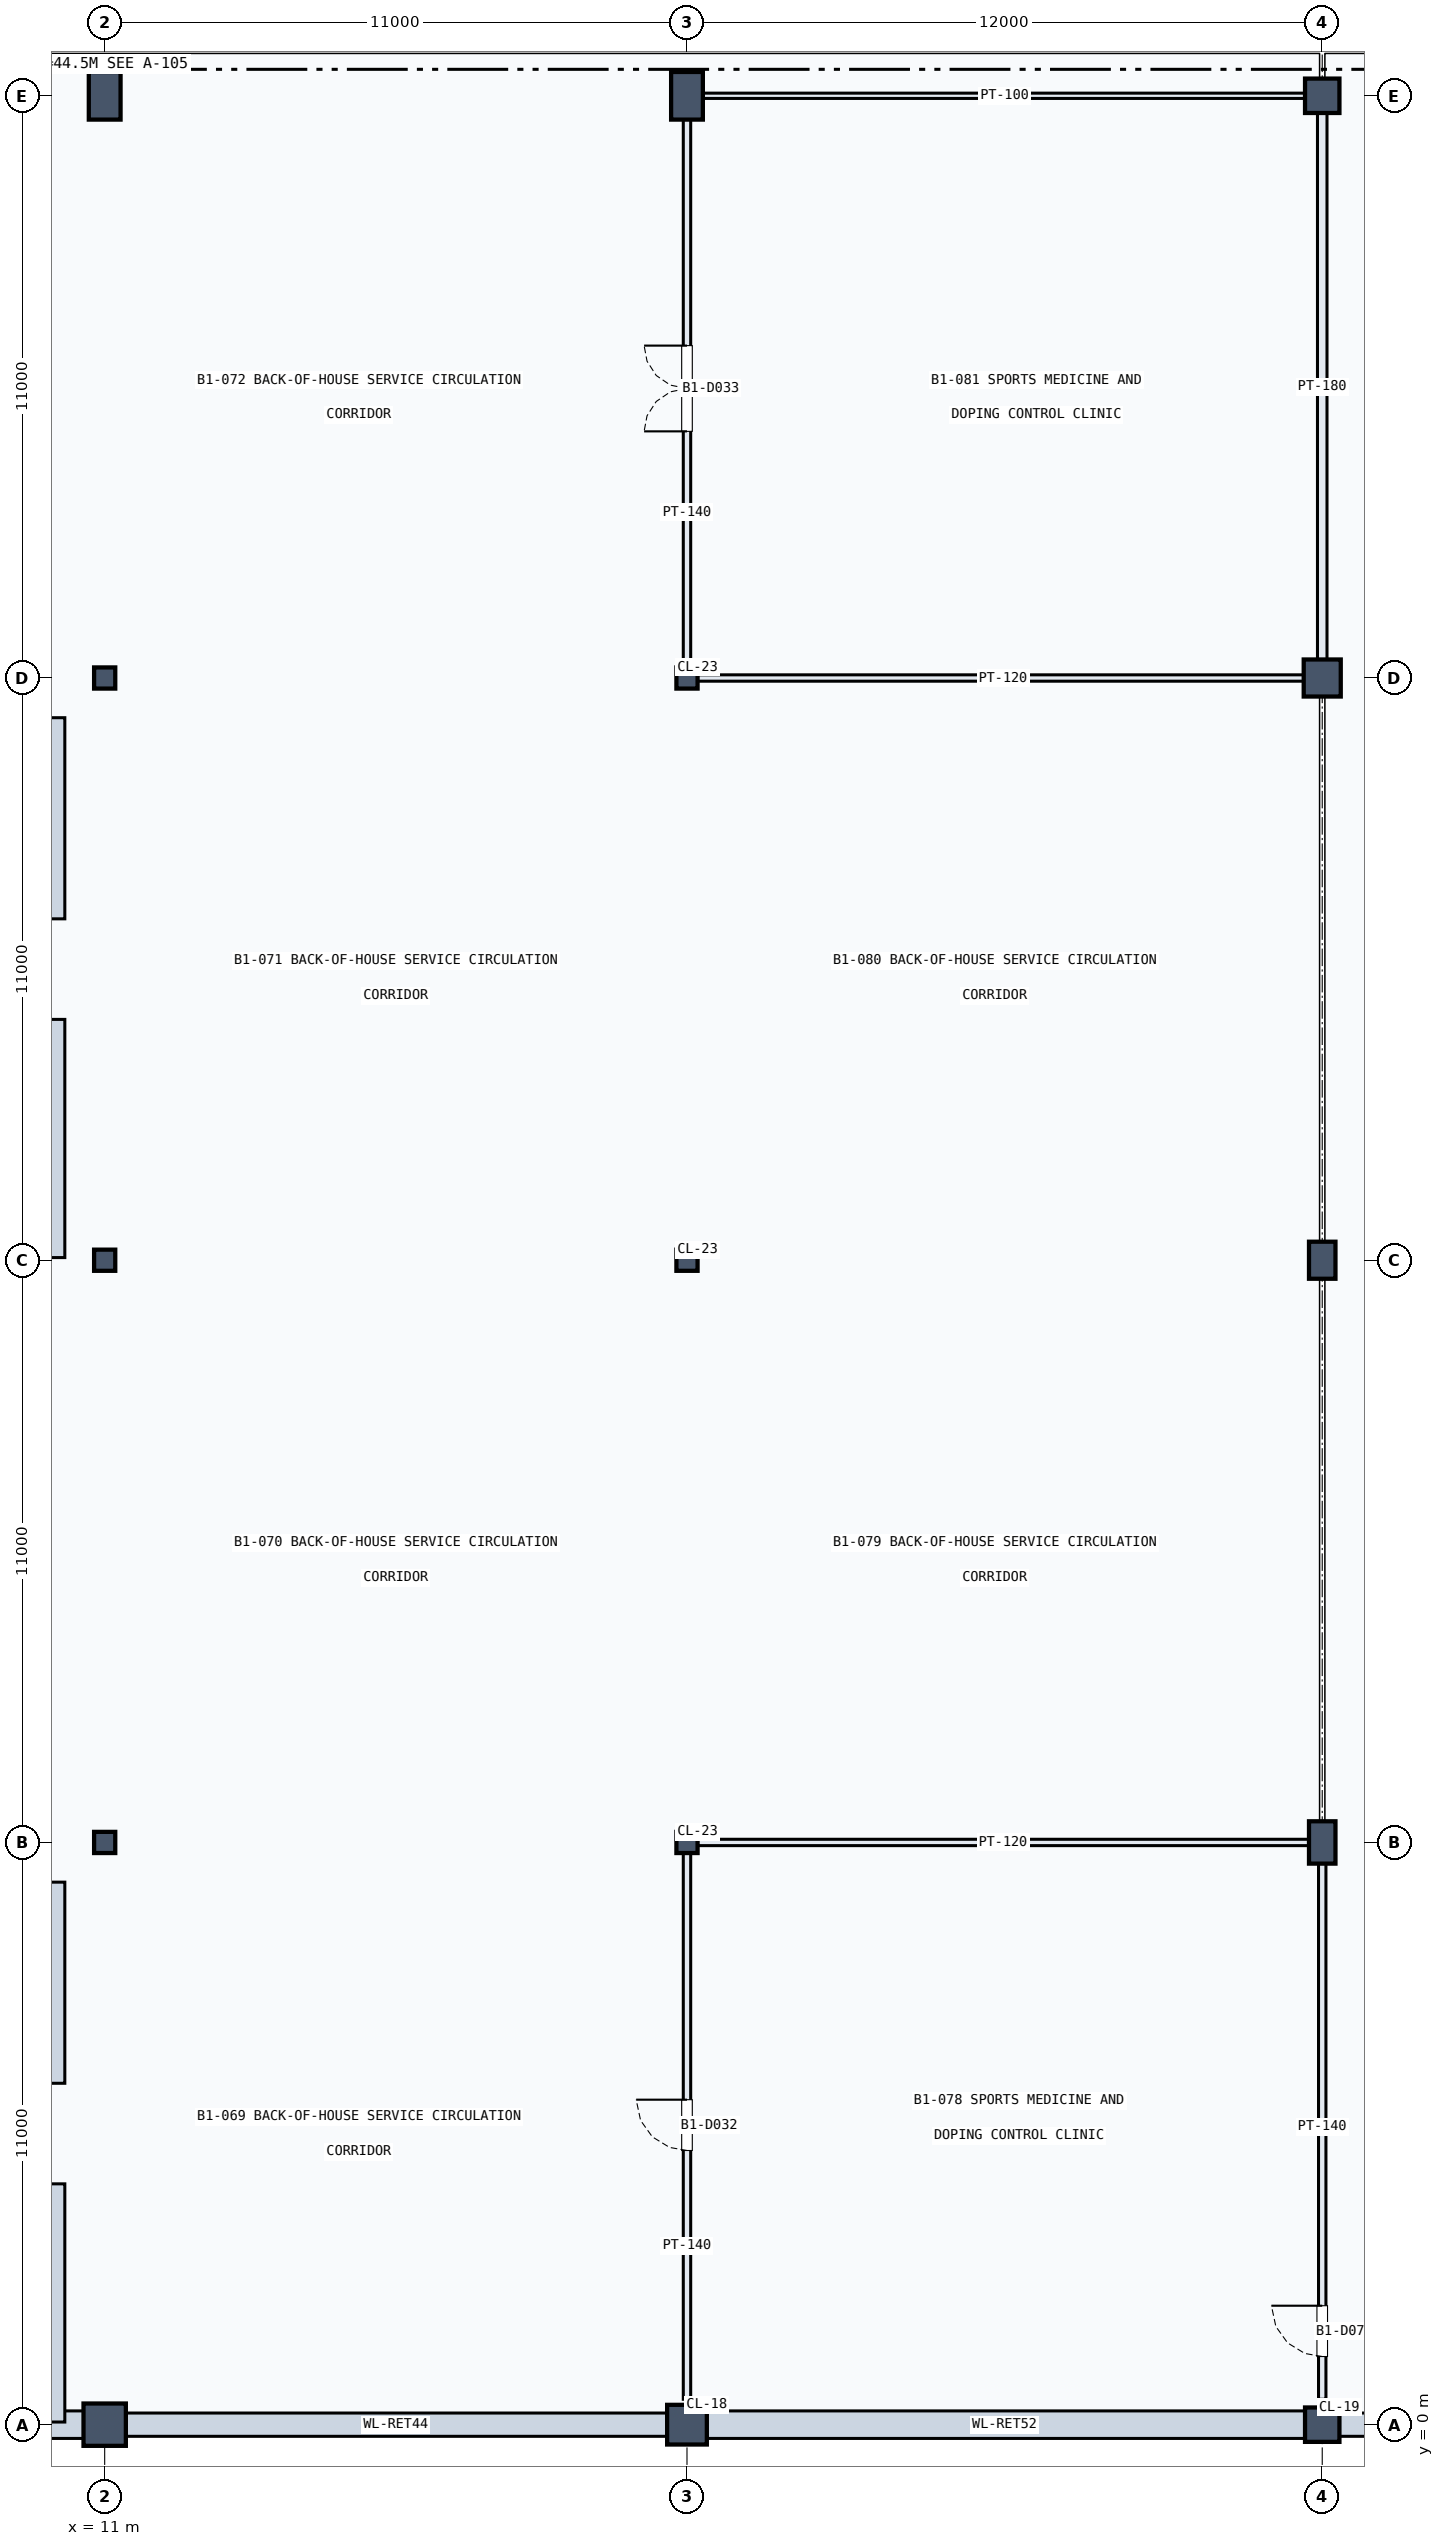
"""IFC4 building model, lengths in metres.
Left out: names, types, materials, properties, quantities, classifications, styles, units other than length and angle.
Written with IfcOpenShell. Run it as: python <this file> out.ifc"""

import sys

from ifc_helpers import new_model, si_unit, direction, frame, frame_2d, origin, origin_2d, place, context, subcontext, project, spatial, rectangle, hollow_rectangle, circle, extrude, element, fill, save


model = new_model("IFC4")
c1 = context("Model", 3, precision=1e-05, world=origin(), true_north=direction((0.0, 1.0)))
c2 = subcontext(c1, "Body", "Model", "MODEL_VIEW")
j1 = project(units=[si_unit("LENGTHUNIT", "METRE"), si_unit("PLANEANGLEUNIT", "RADIAN")], contexts=[c1])
p1 = place(None, origin())
s1 = spatial("IfcSite", under=j1, at=p1, CompositionType="ELEMENT")
p2 = place(p1, origin())
s2 = spatial("IfcBuilding", under=s1, at=p2, CompositionType="ELEMENT")
p3 = place(p2, frame((0.0, 0.0, -5.4)))
s3 = spatial("IfcBuildingStorey", under=s2, at=p3, CompositionType="ELEMENT", Elevation=-5.4)
p4 = place(p3, frame((11.0, 0.0, 0.0), z_axis=(0.0, 0.0, 1.0), x_axis=(1.0, 0.0, 0.0)))
e1 = element("IfcColumn", 1, at=p4, inside=s3, PredefinedType="COLUMN", context=c2, shape_type="SweptSolid", body=[
    extrude(circle(Radius=0.4, at=origin_2d()), origin(), (0.0, 0.0, 1.0), 5.4),
])
for number, where, z_axis, x_axis in (
    (2, (11.0, 11.0, 0.0), (0.0, 0.0, 1.0), (1.0, 0.0, 0.0)),
    (3, (11.0, 22.0, 0.0), (0.0, 0.0, 1.0), (1.0, 0.0, 0.0)),
    (4, (11.0, 33.0, 0.0), (0.0, 0.0, 1.0), (1.0, 0.0, 0.0)),
):
    element("IfcColumn", number, at=place(p3, frame(where, z_axis=z_axis, x_axis=x_axis)), inside=s3, PredefinedType="COLUMN", context=c2, shape_type="SweptSolid", body=[
        extrude(hollow_rectangle(XDim=0.4, YDim=0.4, WallThickness=0.02, at=origin_2d()), origin(), (0.0, 0.0, 1.0), 5.4),
    ])
p5 = place(p3, frame((11.0, 44.0, 0.0), z_axis=(0.0, 0.0, 1.0), x_axis=(1.0, 0.0, 0.0)))
e5 = element("IfcColumn", 5, at=p5, inside=s3, PredefinedType="COLUMN", context=c2, shape_type="SweptSolid", body=[
    extrude(rectangle(XDim=0.6, YDim=0.9, at=origin_2d()), origin(), (0.0, 0.0, 1.0), 5.4),
])
p6 = place(p3, frame((22.0, 0.0, 0.0), z_axis=(0.0, 0.0, 1.0), x_axis=(1.0, 0.0, 0.0)))
e6 = element("IfcColumn", 6, at=p6, inside=s3, PredefinedType="COLUMN", context=c2, shape_type="SweptSolid", body=[
    extrude(circle(Radius=0.375, at=origin_2d()), origin(), (0.0, 0.0, 1.0), 5.4),
])
for number, where, z_axis, x_axis in (
    (7, (22.0, 11.0, 0.0), (0.0, 0.0, 1.0), (1.0, 0.0, 0.0)),
    (8, (22.0, 22.0, 0.0), (0.0, 0.0, 1.0), (1.0, 0.0, 0.0)),
    (9, (22.0, 33.0, 0.0), (0.0, 0.0, 1.0), (1.0, 0.0, 0.0)),
):
    element("IfcColumn", number, at=place(p3, frame(where, z_axis=z_axis, x_axis=x_axis)), inside=s3, PredefinedType="COLUMN", context=c2, shape_type="SweptSolid", body=[
        extrude(hollow_rectangle(XDim=0.4, YDim=0.4, WallThickness=0.02, at=origin_2d()), origin(), (0.0, 0.0, 1.0), 5.4),
    ])
p7 = place(p3, frame((22.0, 44.0, 0.0), z_axis=(0.0, 0.0, 1.0), x_axis=(1.0, 0.0, 0.0)))
e10 = element("IfcColumn", 10, at=p7, inside=s3, PredefinedType="COLUMN", context=c2, shape_type="SweptSolid", body=[
    extrude(rectangle(XDim=0.6, YDim=0.9, at=origin_2d()), origin(), (0.0, 0.0, 1.0), 5.4),
])
p8 = place(p3, frame((34.0, 0.0, 0.0), z_axis=(0.0, 0.0, 1.0), x_axis=(1.0, 0.0, 0.0)))
e11 = element("IfcColumn", 11, at=p8, inside=s3, PredefinedType="COLUMN", context=c2, shape_type="SweptSolid", body=[
    extrude(circle(Radius=0.325, at=origin_2d()), origin(), (0.0, 0.0, 1.0), 5.4),
])
p9 = place(p3, frame((34.0, 11.0, 0.0), z_axis=(0.0, 0.0, 1.0), x_axis=(1.0, 0.0, 0.0)))
e12 = element("IfcColumn", 12, at=p9, inside=s3, PredefinedType="COLUMN", context=c2, shape_type="SweptSolid", body=[
    extrude(rectangle(XDim=0.5, YDim=0.8, at=origin_2d()), origin(), (0.0, 0.0, 1.0), 5.4),
])
p10 = place(p3, frame((34.0, 22.0, 0.0), z_axis=(0.0, 0.0, 1.0), x_axis=(1.0, 0.0, 0.0)))
e13 = element("IfcColumn", 13, at=p10, inside=s3, PredefinedType="COLUMN", context=c2, shape_type="SweptSolid", body=[
    extrude(rectangle(XDim=0.5, YDim=0.7, at=origin_2d()), origin(), (0.0, 0.0, 1.0), 5.4),
])
p11 = place(p3, frame((34.0, 33.0, 0.0), z_axis=(0.0, 0.0, 1.0), x_axis=(1.0, 0.0, 0.0)))
e14 = element("IfcColumn", 14, at=p11, inside=s3, PredefinedType="COLUMN", context=c2, shape_type="SweptSolid", body=[
    extrude(rectangle(XDim=0.7, YDim=0.7, at=origin_2d()), origin(), (0.0, 0.0, 1.0), 5.4),
])
p12 = place(p3, frame((34.0, 44.0, 0.0), z_axis=(0.0, 0.0, 1.0), x_axis=(1.0, 0.0, 0.0)))
e15 = element("IfcColumn", 15, at=p12, inside=s3, PredefinedType="COLUMN", context=c2, shape_type="SweptSolid", body=[
    extrude(rectangle(XDim=0.65, YDim=0.65, at=origin_2d()), origin(), (0.0, 0.0, 1.0), 5.4),
])
p13 = place(p3, frame((0.22, 0.0, 0.0), z_axis=(0.0, 0.0, 1.0), x_axis=(1.0, 0.0, 0.0)))
e16 = element("IfcWall", 16, at=p13, inside=s3, PredefinedType="SOLIDWALL", context=c2, shape_type="SweptSolid", body=[
    extrude(rectangle(XDim=10.56, YDim=0.52, at=frame_2d((5.28, 0.0))), origin(), (0.0, 0.0, 1.0), 4.28),
])
p14 = place(p3, frame((11.22, 0.0, 0.0), z_axis=(0.0, 0.0, 1.0), x_axis=(1.0, 0.0, 0.0)))
e17 = element("IfcWall", 17, at=p14, inside=s3, PredefinedType="SOLIDWALL", context=c2, shape_type="SweptSolid", body=[
    extrude(rectangle(XDim=10.56, YDim=0.44, at=frame_2d((5.28, 0.0))), origin(), (0.0, 0.0, 1.0), 4.28),
])
p15 = place(p3, frame((22.22, 0.0, 0.0), z_axis=(0.0, 0.0, 1.0), x_axis=(1.0, 0.0, 0.0)))
e18 = element("IfcWall", 18, at=p15, inside=s3, PredefinedType="SOLIDWALL", context=c2, shape_type="SweptSolid", body=[
    extrude(rectangle(XDim=11.56, YDim=0.52, at=frame_2d((5.78, 0.0))), origin(), (0.0, 0.0, 1.0), 4.346),
])
p16 = place(p3, frame((34.22, 0.0, 0.0), z_axis=(0.0, 0.0, 1.0), x_axis=(1.0, 0.0, 0.0)))
e19 = element("IfcWall", 19, at=p16, inside=s3, PredefinedType="SOLIDWALL", context=c2, shape_type="SweptSolid", body=[
    extrude(rectangle(XDim=11.56, YDim=0.44, at=frame_2d((5.78, 0.0))), origin(), (0.0, 0.0, 1.0), 4.13),
])
p17 = place(p3, frame((10.072, 22.05, 0.0), z_axis=(0.0, 0.0, 1.0), x_axis=(0.0, 1.0, 0.0)))
e20 = element("IfcWall", 20, at=p17, inside=s3, PredefinedType="SOLIDWALL", context=c2, shape_type="SweptSolid", body=[
    extrude(rectangle(XDim=4.5, YDim=0.35, at=frame_2d((2.25, 0.0))), origin(), (0.0, 0.0, 1.0), 5.04),
])
p18 = place(p3, frame((10.072, 28.45, 0.0), z_axis=(0.0, 0.0, 1.0), x_axis=(0.0, 1.0, 0.0)))
e21 = element("IfcWall", 21, at=p18, inside=s3, PredefinedType="SOLIDWALL", context=c2, shape_type="SweptSolid", body=[
    extrude(rectangle(XDim=3.8, YDim=0.35, at=frame_2d((1.9, 0.0))), origin(), (0.0, 0.0, 1.0), 5.04),
])
p19 = place(p3, frame((10.072, 0.05, 0.0), z_axis=(0.0, 0.0, 1.0), x_axis=(0.0, 1.0, 0.0)))
e22 = element("IfcWall", 22, at=p19, inside=s3, PredefinedType="SOLIDWALL", context=c2, shape_type="SweptSolid", body=[
    extrude(rectangle(XDim=4.5, YDim=0.35, at=frame_2d((2.25, 0.0))), origin(), (0.0, 0.0, 1.0), 5.04),
])
p20 = place(p3, frame((10.072, 6.45, 0.0), z_axis=(0.0, 0.0, 1.0), x_axis=(0.0, 1.0, 0.0)))
e23 = element("IfcWall", 23, at=p20, inside=s3, PredefinedType="SOLIDWALL", context=c2, shape_type="SweptSolid", body=[
    extrude(rectangle(XDim=3.8, YDim=0.35, at=frame_2d((1.9, 0.0))), origin(), (0.0, 0.0, 1.0), 5.04),
])
p21 = place(p3, frame((22.0, 0.48, 0.0), z_axis=(0.0, 0.0, 1.0), x_axis=(0.0, 1.0, 0.0)))
e24 = element("IfcWall", 24, at=p21, inside=s3, PredefinedType="PARTITIONING", context=c2, shape_type="SweptSolid", body=[
    extrude(rectangle(XDim=10.36, YDim=0.14, at=frame_2d((5.18, 0.0))), origin(), (0.0, 0.0, 1.0), 4.28),
])
p22 = place(p21, frame((4.7, 0.0, 0.0)))
e25 = element("IfcOpeningElement", 25, at=p22, cuts=e24, PredefinedType="OPENING", context=c2, shape_type="SweptSolid", body=[
    extrude(rectangle(XDim=0.96, YDim=2.15, at=frame_2d((0.48, 1.075))), frame((0.0, 0.08, 0.0), z_axis=(0.0, -1.0, 0.0), x_axis=(1.0, 0.0, 0.0)), (0.0, 0.0, 1.0), 0.16),
])
p23 = place(p3, frame((22.0, 33.16, 0.0), z_axis=(0.0, 0.0, 1.0), x_axis=(0.0, 1.0, 0.0)))
e26 = element("IfcWall", 26, at=p23, inside=s3, PredefinedType="PARTITIONING", context=c2, shape_type="SweptSolid", body=[
    extrude(rectangle(XDim=10.62, YDim=0.14, at=frame_2d((5.31, 0.0))), origin(), (0.0, 0.0, 1.0), 4.41),
])
p24 = place(p23, frame((4.5, 0.0, 0.0)))
e27 = element("IfcOpeningElement", 27, at=p24, cuts=e26, PredefinedType="OPENING", context=c2, shape_type="SweptSolid", body=[
    extrude(rectangle(XDim=1.62, YDim=2.25, at=frame_2d((0.81, 1.125))), frame((0.0, 0.08, 0.0), z_axis=(0.0, -1.0, 0.0), x_axis=(1.0, 0.0, 0.0)), (0.0, 0.0, 1.0), 0.16),
])
p25 = place(p3, frame((22.16, 11.0, 0.0), z_axis=(0.0, 0.0, 1.0), x_axis=(1.0, 0.0, 0.0)))
e28 = element("IfcWall", 28, at=p25, inside=s3, PredefinedType="PARTITIONING", context=c2, shape_type="SweptSolid", body=[
    extrude(rectangle(XDim=11.62, YDim=0.12, at=frame_2d((5.81, 0.0))), origin(), (0.0, 0.0, 1.0), 4.28),
])
p26 = place(p3, frame((22.16, 33.0, 0.0), z_axis=(0.0, 0.0, 1.0), x_axis=(1.0, 0.0, 0.0)))
e29 = element("IfcWall", 29, at=p26, inside=s3, PredefinedType="PARTITIONING", context=c2, shape_type="SweptSolid", body=[
    extrude(rectangle(XDim=11.62, YDim=0.12, at=frame_2d((5.81, 0.0))), origin(), (0.0, 0.0, 1.0), 4.13),
])
p27 = place(p3, frame((22.22, 44.0, 0.0), z_axis=(0.0, 0.0, 1.0), x_axis=(1.0, 0.0, 0.0)))
e30 = element("IfcWall", 30, at=p27, inside=s3, PredefinedType="PARTITIONING", context=c2, shape_type="SweptSolid", body=[
    extrude(rectangle(XDim=11.56, YDim=0.1, at=frame_2d((5.78, 0.0))), origin(), (0.0, 0.0, 1.0), 4.08),
])
p28 = place(p3, frame((34.0, 0.48, 0.0), z_axis=(0.0, 0.0, 1.0), x_axis=(0.0, 1.0, 0.0)))
e31 = element("IfcWall", 31, at=p28, inside=s3, PredefinedType="PARTITIONING", context=c2, shape_type="SweptSolid", body=[
    extrude(rectangle(XDim=10.3, YDim=0.14, at=frame_2d((5.15, 0.0))), origin(), (0.0, 0.0, 1.0), 4.33),
])
p29 = place(p28, frame((0.808, 0.0, 0.0)))
e32 = element("IfcOpeningElement", 32, at=p29, cuts=e31, PredefinedType="OPENING", context=c2, shape_type="SweptSolid", body=[
    extrude(rectangle(XDim=0.96, YDim=2.15, at=frame_2d((0.48, 1.075))), frame((0.0, 0.08, 0.0), z_axis=(0.0, -1.0, 0.0), x_axis=(1.0, 0.0, 0.0)), (0.0, 0.0, 1.0), 0.16),
])
p30 = place(p3, frame((34.0, 33.22, 0.0), z_axis=(0.0, 0.0, 1.0), x_axis=(0.0, 1.0, 0.0)))
e33 = element("IfcWall", 33, at=p30, inside=s3, PredefinedType="PARTITIONING", context=c2, shape_type="SweptSolid", body=[
    extrude(rectangle(XDim=10.56, YDim=0.18, at=frame_2d((5.28, 0.0))), origin(), (0.0, 0.0, 1.0), 4.08),
])
p31 = place(p22, origin())
e34 = element("IfcDoor", 34, at=p31, inside=s3, OperationType="SINGLE_SWING_RIGHT", PredefinedType="DOOR", context=c2, shape_type="SweptSolid", body=[
    extrude(rectangle(XDim=0.96, YDim=2.15, at=frame_2d((0.48, 1.075))), frame((0.0, 0.025, 0.0), z_axis=(0.0, -1.0, 0.0), x_axis=(1.0, 0.0, 0.0)), (0.0, 0.0, 1.0), 0.05),
])
fill(e25, e34)
p32 = place(p24, origin())
e35 = element("IfcDoor", 35, at=p32, inside=s3, OperationType="DOUBLE_DOOR_SINGLE_SWING", PredefinedType="DOOR", context=c2, shape_type="SweptSolid", body=[
    extrude(rectangle(XDim=1.62, YDim=2.25, at=frame_2d((0.81, 1.125))), frame((0.0, 0.025, 0.0), z_axis=(0.0, -1.0, 0.0), x_axis=(1.0, 0.0, 0.0)), (0.0, 0.0, 1.0), 0.05),
])
fill(e27, e35)
p33 = place(p29, origin())
e36 = element("IfcDoor", 36, at=p33, inside=s3, OperationType="SINGLE_SWING_RIGHT", PredefinedType="DOOR", context=c2, shape_type="SweptSolid", body=[
    extrude(rectangle(XDim=0.96, YDim=2.15, at=frame_2d((0.48, 1.075))), frame((0.0, 0.025, 0.0), z_axis=(0.0, -1.0, 0.0), x_axis=(1.0, 0.0, 0.0)), (0.0, 0.0, 1.0), 0.05),
])
fill(e32, e36)
save(model, sys.argv[1])
